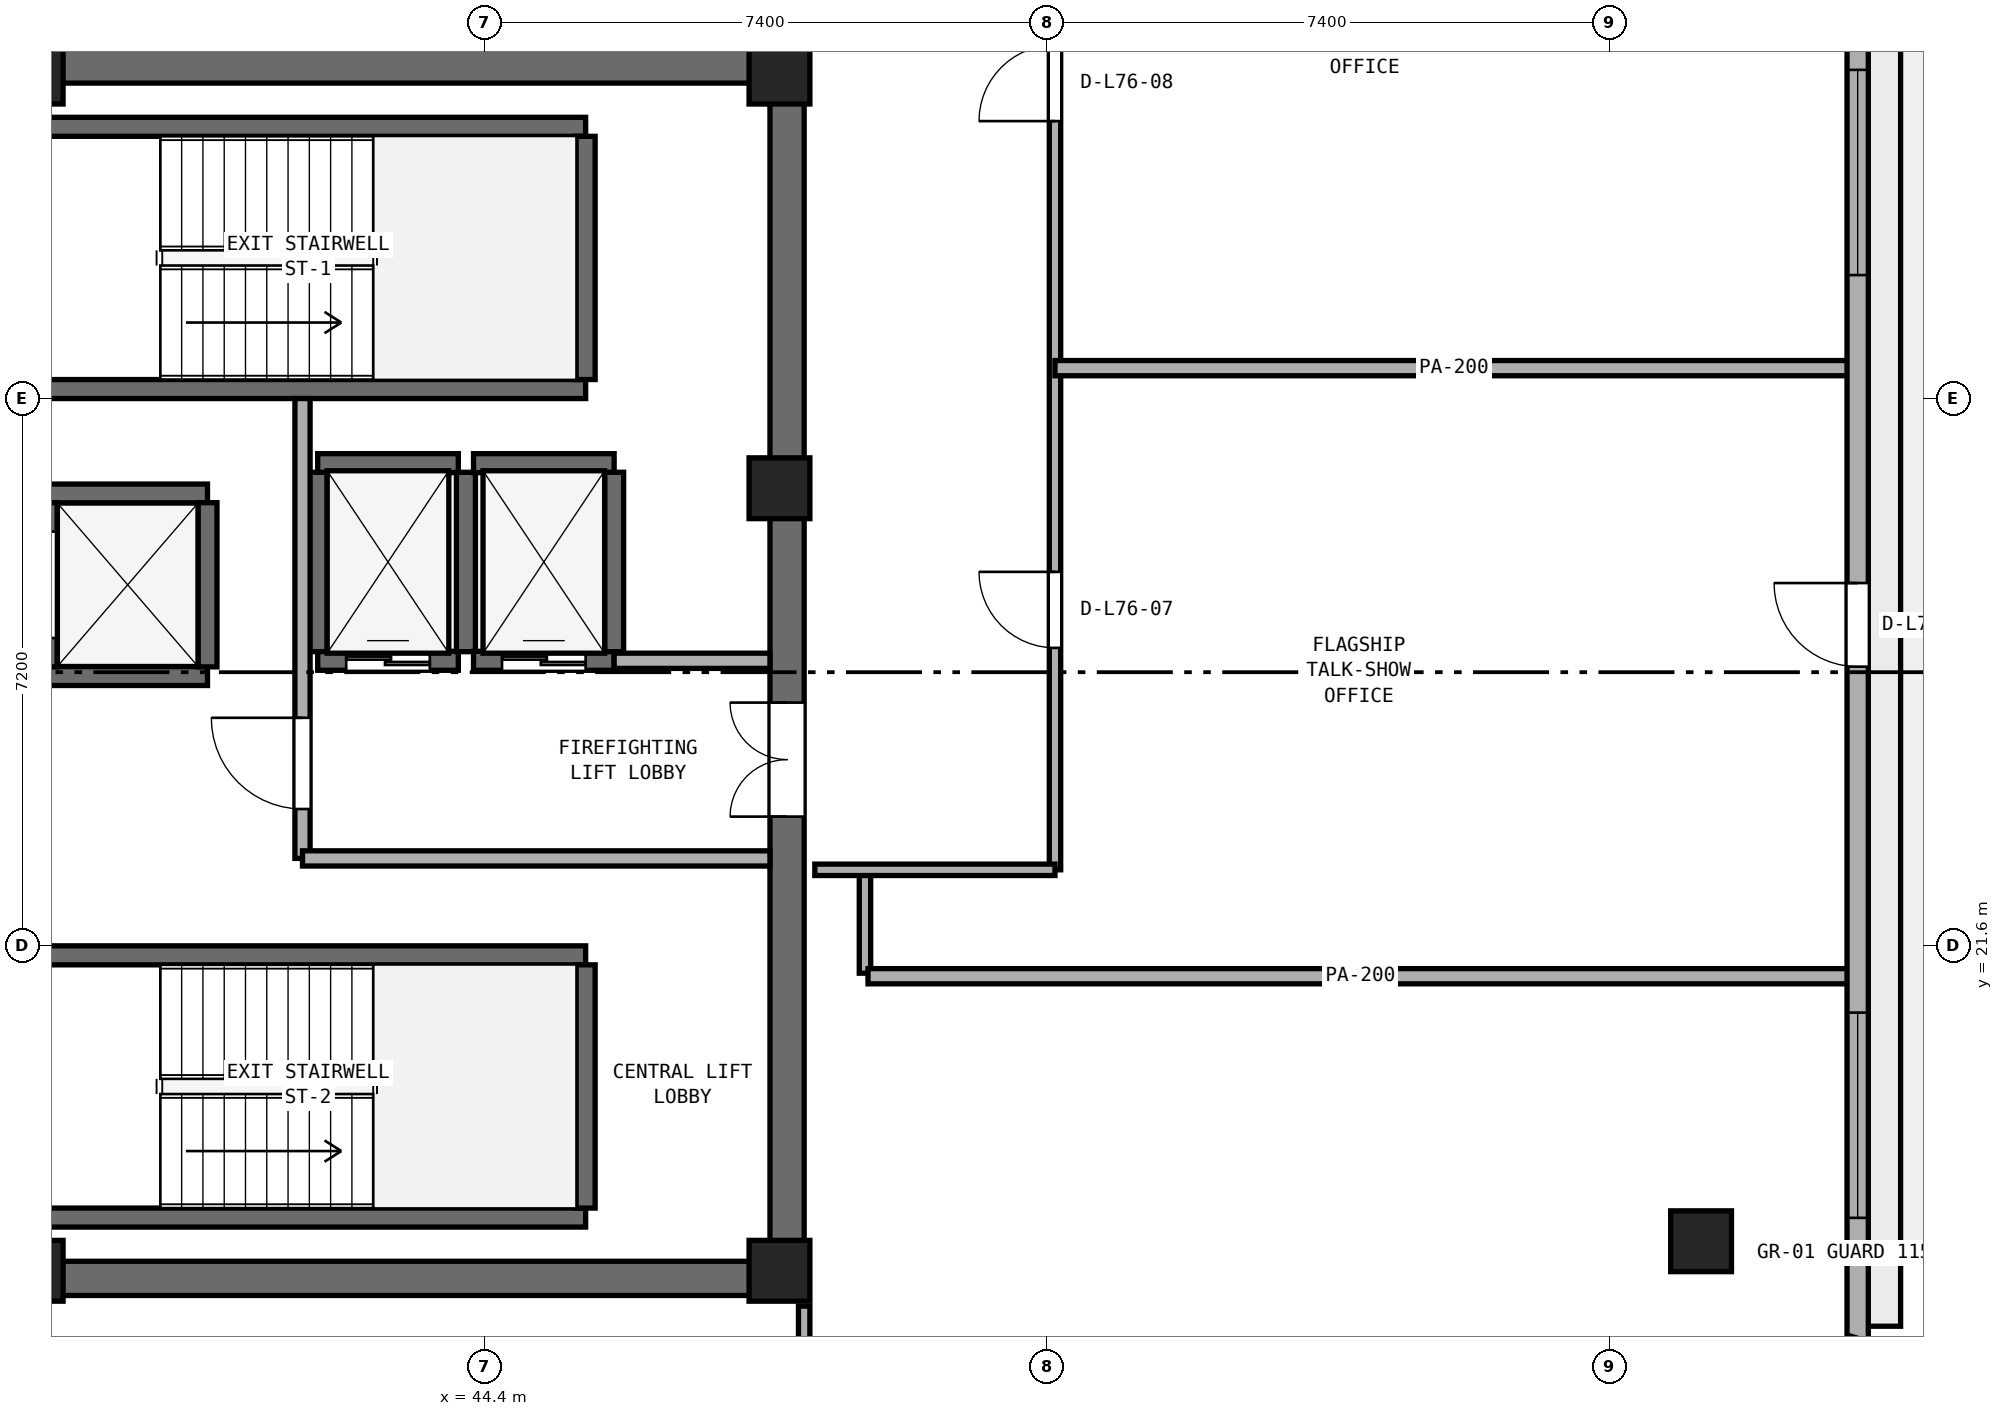
"""IFC4 building model, lengths in metres.
Left out: names, types, materials, properties, quantities, classifications, styles, units other than length and angle.
Written with IfcOpenShell. Run it as: python <this file> out.ifc"""

import sys

from ifc_helpers import new_model, si_unit, direction, frame, frame_2d, origin, origin_2d, place, context, subcontext, project, spatial, rectangle, extrude, element, fill, save


model = new_model("IFC4")
c1 = context("Model", 3, precision=1e-05, world=origin(), true_north=direction((0.0, 1.0)))
c2 = subcontext(c1, "Body", "Model", "MODEL_VIEW")
j1 = project(units=[si_unit("LENGTHUNIT", "METRE"), si_unit("PLANEANGLEUNIT", "RADIAN")], contexts=[c1])
p1 = place(None, origin())
s1 = spatial("IfcSite", under=j1, at=p1, CompositionType="ELEMENT")
p2 = place(p1, origin())
s2 = spatial("IfcBuilding", under=s1, at=p2, CompositionType="ELEMENT")
p3 = place(p2, frame((0.0, 0.0, 297.2)))
s3 = spatial("IfcBuildingStorey", under=s2, at=p3, CompositionType="ELEMENT", Elevation=297.2)
for number, where, z_axis, x_axis in (
    (1, (25.4, 17.225, 0.0), (0.0, 0.0, 1.0), (1.0, 0.0, 0.0)),
    (2, (25.4, 33.175, 0.0), (0.0, 0.0, 1.0), (1.0, 0.0, 0.0)),
):
    element("IfcWall", number, at=place(p3, frame(where, z_axis=z_axis, x_axis=x_axis)), inside=s3, PredefinedType="SHEAR", context=c2, shape_type="SweptSolid", body=[
        extrude(rectangle(XDim=23.2, YDim=0.45, at=frame_2d((11.6, 0.0))), origin(), (0.0, 0.0, 1.0), 3.54),
    ])
p4 = place(p3, frame((48.375, 17.45, 0.0), z_axis=(0.0, 0.0, 1.0), x_axis=(0.0, 1.0, 0.0)))
e3 = element("IfcWall", 3, at=p4, inside=s3, PredefinedType="SHEAR", context=c2, shape_type="SweptSolid", body=[
    extrude(rectangle(XDim=15.5, YDim=0.45, at=frame_2d((7.75, 0.0))), origin(), (0.0, 0.0, 1.0), 3.54),
])
p5 = place(p4, frame((5.85, 0.0, 0.0)))
e4 = element("IfcOpeningElement", 4, at=p5, cuts=e3, PredefinedType="OPENING", context=c2, shape_type="SweptSolid", body=[
    extrude(rectangle(XDim=1.5, YDim=2.15, at=frame_2d((0.75, 1.075))), frame((0.0, 0.235, 0.0), z_axis=(0.0, -1.0, 0.0), x_axis=(1.0, 0.0, 0.0)), (0.0, 0.0, 1.0), 0.47),
])
for number, where, z_axis, x_axis in (
    (5, (38.45, 17.325, 0.0), (0.0, 0.0, 1.0), (1.0, 0.0, 0.0)),
    (6, (48.275, 17.325, 0.0), (0.0, 0.0, 1.0), (1.0, 0.0, 0.0)),
    (7, (48.275, 27.62, 0.0), (0.0, 0.0, 1.0), (1.0, 0.0, 0.0)),
    (8, (48.275, 33.075, 0.0), (0.0, 0.0, 1.0), (1.0, 0.0, 0.0)),
    (9, (38.45, 33.075, 0.0), (0.0, 0.0, 1.0), (1.0, 0.0, 0.0)),
):
    element("IfcColumn", number, at=place(p3, frame(where, z_axis=z_axis, x_axis=x_axis)), inside=s3, PredefinedType="PILASTER", context=c2, shape_type="SweptSolid", body=[
        extrude(rectangle(XDim=0.8, YDim=0.8, at=origin_2d()), origin(), (0.0, 0.0, 1.0), 3.8),
    ])
p6 = place(p3, frame((60.4, 17.714, 0.0), z_axis=(0.0, 0.0, 1.0), x_axis=(1.0, 0.0, 0.0)))
e10 = element("IfcColumn", 10, at=p6, inside=s3, PredefinedType="COLUMN", context=c2, shape_type="SweptSolid", body=[
    extrude(rectangle(XDim=0.8, YDim=0.8, at=origin_2d()), origin(), (0.0, 0.0, 1.0), 3.8),
])
for number, where, z_axis, x_axis in (
    (11, (38.425, 28.925, 0.0), (0.0, 0.0, 1.0), (1.0, 0.0, 0.0)),
    (12, (38.425, 32.375, 0.0), (0.0, 0.0, 1.0), (1.0, 0.0, 0.0)),
):
    element("IfcWall", number, at=place(p3, frame(where, z_axis=z_axis, x_axis=x_axis)), inside=s3, PredefinedType="SHEAR", context=c2, shape_type="SweptSolid", body=[
        extrude(rectangle(XDim=7.3, YDim=0.25, at=frame_2d((3.65, 0.0))), origin(), (0.0, 0.0, 1.0), 3.54),
    ])
p7 = place(p3, frame((45.725, 29.05, 0.0), z_axis=(0.0, 0.0, 1.0), x_axis=(0.0, 1.0, 0.0)))
e13 = element("IfcWall", 13, at=p7, inside=s3, PredefinedType="SHEAR", context=c2, shape_type="SweptSolid", body=[
    extrude(rectangle(XDim=3.2, YDim=0.25, at=frame_2d((1.6, 0.0))), origin(), (0.0, 0.0, 1.0), 3.54),
])
for number, where, z_axis, x_axis in (
    (14, (38.425, 18.025, 0.0), (0.0, 0.0, 1.0), (1.0, 0.0, 0.0)),
    (15, (38.425, 21.475, 0.0), (0.0, 0.0, 1.0), (1.0, 0.0, 0.0)),
):
    element("IfcWall", number, at=place(p3, frame(where, z_axis=z_axis, x_axis=x_axis)), inside=s3, PredefinedType="SHEAR", context=c2, shape_type="SweptSolid", body=[
        extrude(rectangle(XDim=7.3, YDim=0.25, at=frame_2d((3.65, 0.0))), origin(), (0.0, 0.0, 1.0), 3.54),
    ])
p8 = place(p3, frame((45.725, 18.15, 0.0), z_axis=(0.0, 0.0, 1.0), x_axis=(0.0, 1.0, 0.0)))
e16 = element("IfcWall", 16, at=p8, inside=s3, PredefinedType="SHEAR", context=c2, shape_type="SweptSolid", body=[
    extrude(rectangle(XDim=3.2, YDim=0.25, at=frame_2d((1.6, 0.0))), origin(), (0.0, 0.0, 1.0), 3.54),
])
p9 = place(p3, frame((42.2, 25.35, 0.0), z_axis=(0.0, 0.0, 1.0), x_axis=(1.0, 0.0, 0.0)))
e17 = element("IfcWall", 17, at=p9, inside=s3, PredefinedType="SHEAR", context=c2, shape_type="SweptSolid", body=[
    extrude(rectangle(XDim=1.85, YDim=0.25, at=frame_2d((0.925, 0.0))), origin(), (0.0, 0.0, 1.0), 3.54),
])
p10 = place(p9, frame((0.375, 0.0, 0.0)))
e18 = element("IfcOpeningElement", 18, at=p10, cuts=e17, PredefinedType="OPENING", context=c2, shape_type="SweptSolid", body=[
    extrude(rectangle(XDim=1.1, YDim=2.15, at=frame_2d((0.55, 1.075))), frame((0.0, 0.135, 0.0), z_axis=(0.0, -1.0, 0.0), x_axis=(1.0, 0.0, 0.0)), (0.0, 0.0, 1.0), 0.27),
])
p11 = place(p3, frame((42.2, 27.95, 0.0), z_axis=(0.0, 0.0, 1.0), x_axis=(1.0, 0.0, 0.0)))
e19 = element("IfcWall", 19, at=p11, inside=s3, PredefinedType="SHEAR", context=c2, shape_type="SweptSolid", body=[
    extrude(rectangle(XDim=1.85, YDim=0.25, at=frame_2d((0.925, 0.0))), origin(), (0.0, 0.0, 1.0), 3.54),
])
for number, where, z_axis, x_axis in (
    (20, (42.2, 25.47, 0.0), (0.0, 0.0, 1.0), (0.0, 1.0, 0.0)),
    (21, (44.15, 25.47, 0.0), (0.0, 0.0, 1.0), (0.0, 1.0, 0.0)),
):
    element("IfcWall", number, at=place(p3, frame(where, z_axis=z_axis, x_axis=x_axis)), inside=s3, PredefinedType="SHEAR", context=c2, shape_type="SweptSolid", body=[
        extrude(rectangle(XDim=2.36, YDim=0.25, at=frame_2d((1.18, 0.0))), origin(), (0.0, 0.0, 1.0), 3.54),
    ])
p12 = place(p3, frame((44.25, 25.35, 0.0), z_axis=(0.0, 0.0, 1.0), x_axis=(1.0, 0.0, 0.0)))
e22 = element("IfcWall", 22, at=p12, inside=s3, PredefinedType="SHEAR", context=c2, shape_type="SweptSolid", body=[
    extrude(rectangle(XDim=1.85, YDim=0.25, at=frame_2d((0.925, 0.0))), origin(), (0.0, 0.0, 1.0), 3.54),
])
p13 = place(p12, frame((0.375, 0.0, 0.0)))
e23 = element("IfcOpeningElement", 23, at=p13, cuts=e22, PredefinedType="OPENING", context=c2, shape_type="SweptSolid", body=[
    extrude(rectangle(XDim=1.1, YDim=2.15, at=frame_2d((0.55, 1.075))), frame((0.0, 0.135, 0.0), z_axis=(0.0, -1.0, 0.0), x_axis=(1.0, 0.0, 0.0)), (0.0, 0.0, 1.0), 0.27),
])
p14 = place(p3, frame((44.25, 27.95, 0.0), z_axis=(0.0, 0.0, 1.0), x_axis=(1.0, 0.0, 0.0)))
e24 = element("IfcWall", 24, at=p14, inside=s3, PredefinedType="SHEAR", context=c2, shape_type="SweptSolid", body=[
    extrude(rectangle(XDim=1.85, YDim=0.25, at=frame_2d((0.925, 0.0))), origin(), (0.0, 0.0, 1.0), 3.54),
])
p15 = place(p3, frame((46.1, 25.47, 0.0), z_axis=(0.0, 0.0, 1.0), x_axis=(0.0, 1.0, 0.0)))
e25 = element("IfcWall", 25, at=p15, inside=s3, PredefinedType="SHEAR", context=c2, shape_type="SweptSolid", body=[
    extrude(rectangle(XDim=2.36, YDim=0.25, at=frame_2d((1.18, 0.0))), origin(), (0.0, 0.0, 1.0), 3.54),
])
for number, where, z_axis, x_axis in (
    (26, (38.65, 25.15, 0.0), (0.0, 0.0, 1.0), (1.0, 0.0, 0.0)),
    (27, (38.65, 27.55, 0.0), (0.0, 0.0, 1.0), (1.0, 0.0, 0.0)),
):
    element("IfcWall", number, at=place(p3, frame(where, z_axis=z_axis, x_axis=x_axis)), inside=s3, PredefinedType="SHEAR", context=c2, shape_type="SweptSolid", body=[
        extrude(rectangle(XDim=2.1, YDim=0.25, at=frame_2d((1.05, 0.0))), origin(), (0.0, 0.0, 1.0), 3.54),
    ])
p16 = place(p3, frame((38.65, 25.27, 0.0), z_axis=(0.0, 0.0, 1.0), x_axis=(0.0, 1.0, 0.0)))
e28 = element("IfcWall", 28, at=p16, inside=s3, PredefinedType="SHEAR", context=c2, shape_type="SweptSolid", body=[
    extrude(rectangle(XDim=2.16, YDim=0.25, at=frame_2d((1.08, 0.0))), origin(), (0.0, 0.0, 1.0), 3.54),
])
p17 = place(p16, frame((0.38, 0.0, 0.0)))
e29 = element("IfcOpeningElement", 29, at=p17, cuts=e28, PredefinedType="OPENING", context=c2, shape_type="SweptSolid", body=[
    extrude(rectangle(XDim=1.4, YDim=2.2, at=frame_2d((0.7, 1.1))), frame((0.0, 0.135, 0.0), z_axis=(0.0, -1.0, 0.0), x_axis=(1.0, 0.0, 0.0)), (0.0, 0.0, 1.0), 0.27),
])
p18 = place(p3, frame((40.75, 25.27, 0.0), z_axis=(0.0, 0.0, 1.0), x_axis=(0.0, 1.0, 0.0)))
e30 = element("IfcWall", 30, at=p18, inside=s3, PredefinedType="SHEAR", context=c2, shape_type="SweptSolid", body=[
    extrude(rectangle(XDim=2.16, YDim=0.25, at=frame_2d((1.08, 0.0))), origin(), (0.0, 0.0, 1.0), 3.54),
])
p19 = place(p3, frame((42.0, 22.75, 0.0), z_axis=(0.0, 0.0, 1.0), x_axis=(0.0, 1.0, 0.0)))
e31 = element("IfcWall", 31, at=p19, inside=s3, PredefinedType="SOLIDWALL", context=c2, shape_type="SweptSolid", body=[
    extrude(rectangle(XDim=6.05, YDim=0.2, at=frame_2d((3.025, 0.0))), origin(), (0.0, 0.0, 1.0), 3.54),
])
p20 = place(p19, frame((0.65, 0.0, 0.0)))
e32 = element("IfcOpeningElement", 32, at=p20, cuts=e31, PredefinedType="OPENING", context=c2, shape_type="SweptSolid", body=[
    extrude(rectangle(XDim=1.2, YDim=2.15, at=frame_2d((0.6, 1.075))), frame((0.0, 0.11, 0.0), z_axis=(0.0, -1.0, 0.0), x_axis=(1.0, 0.0, 0.0)), (0.0, 0.0, 1.0), 0.22),
])
p21 = place(p3, frame((42.0, 22.75, 0.0), z_axis=(0.0, 0.0, 1.0), x_axis=(1.0, 0.0, 0.0)))
e33 = element("IfcWall", 33, at=p21, inside=s3, PredefinedType="SOLIDWALL", context=c2, shape_type="SweptSolid", body=[
    extrude(rectangle(XDim=6.15, YDim=0.2, at=frame_2d((3.075, 0.0))), origin(), (0.0, 0.0, 1.0), 3.54),
])
p22 = place(p3, frame((46.1, 25.35, 0.0), z_axis=(0.0, 0.0, 1.0), x_axis=(1.0, 0.0, 0.0)))
e34 = element("IfcWall", 34, at=p22, inside=s3, PredefinedType="SOLIDWALL", context=c2, shape_type="SweptSolid", body=[
    extrude(rectangle(XDim=2.05, YDim=0.2, at=frame_2d((1.025, 0.0))), origin(), (0.0, 0.0, 1.0), 3.54),
])
p23 = place(p3, frame((51.9, 22.6, 0.0), z_axis=(0.0, 0.0, 1.0), x_axis=(0.0, 1.0, 0.0)))
e35 = element("IfcWall", 35, at=p23, inside=s3, PredefinedType="PARTITIONING", context=c2, shape_type="SweptSolid", body=[
    extrude(rectangle(XDim=22.376, YDim=0.15, at=frame_2d((11.188, 0.0))), origin(), (0.0, 0.0, 1.0), 3.54),
])
p24 = place(p23, frame((2.92, 0.0, 0.0)))
e36 = element("IfcOpeningElement", 36, at=p24, cuts=e35, PredefinedType="OPENING", context=c2, shape_type="SweptSolid", body=[
    extrude(rectangle(XDim=1.0, YDim=2.12, at=frame_2d((0.5, 1.06))), frame((0.0, 0.085, 0.0), z_axis=(0.0, -1.0, 0.0), x_axis=(1.0, 0.0, 0.0)), (0.0, 0.0, 1.0), 0.17),
])
p25 = place(p23, frame((9.85, 0.0, 0.0)))
e37 = element("IfcOpeningElement", 37, at=p25, cuts=e35, PredefinedType="OPENING", context=c2, shape_type="SweptSolid", body=[
    extrude(rectangle(XDim=1.0, YDim=2.12, at=frame_2d((0.5, 1.06))), frame((0.0, 0.085, 0.0), z_axis=(0.0, -1.0, 0.0), x_axis=(1.0, 0.0, 0.0)), (0.0, 0.0, 1.0), 0.17),
])
p26 = place(p3, frame((49.4, 21.24, 0.0), z_axis=(0.0, 0.0, 1.0), x_axis=(0.0, 1.0, 0.0)))
e38 = element("IfcWall", 38, at=p26, inside=s3, PredefinedType="PARTITIONING", context=c2, shape_type="SweptSolid", body=[
    extrude(rectangle(XDim=1.359, YDim=0.15, at=frame_2d((0.68, 0.0))), origin(), (0.0, 0.0, 1.0), 3.54),
])
p27 = place(p3, frame((48.6, 13.7, 0.0), z_axis=(0.0, 0.0, 1.0), x_axis=(0.0, 1.0, 0.0)))
e39 = element("IfcWall", 39, at=p27, inside=s3, PredefinedType="PARTITIONING", context=c2, shape_type="SweptSolid", body=[
    extrude(rectangle(XDim=3.16, YDim=0.15, at=frame_2d((1.58, 0.0))), origin(), (0.0, 0.0, 1.0), 3.54),
])
p28 = place(p3, frame((49.44, 21.2, 0.0), z_axis=(0.0, 0.0, 1.0), x_axis=(1.0, 0.0, 0.0)))
e40 = element("IfcWall", 40, at=p28, inside=s3, PredefinedType="PARTITIONING", context=c2, shape_type="SweptSolid", body=[
    extrude(rectangle(XDim=12.955, YDim=0.2, at=frame_2d((6.478, 0.0))), origin(), (0.0, 0.0, 1.0), 3.54),
])
p29 = place(p3, frame((48.74, 22.6, 0.0), z_axis=(0.0, 0.0, 1.0), x_axis=(1.0, 0.0, 0.0)))
e41 = element("IfcWall", 41, at=p29, inside=s3, PredefinedType="PARTITIONING", context=c2, shape_type="SweptSolid", body=[
    extrude(rectangle(XDim=3.16, YDim=0.15, at=frame_2d((1.58, 0.0))), origin(), (0.0, 0.0, 1.0), 3.54),
])
p30 = place(p3, frame((51.9, 29.2, 0.0), z_axis=(0.0, 0.0, 1.0), x_axis=(1.0, 0.0, 0.0)))
e42 = element("IfcWall", 42, at=p30, inside=s3, PredefinedType="PARTITIONING", context=c2, shape_type="SweptSolid", body=[
    extrude(rectangle(XDim=10.495, YDim=0.2, at=frame_2d((5.248, 0.0))), origin(), (0.0, 0.0, 1.0), 3.54),
])
p31 = place(p3, frame((62.46, 16.396, 0.0), z_axis=(0.0, 0.0, 1.0), x_axis=(0.0, 1.0, 0.0)))
e43 = element("IfcWall", 43, at=p31, inside=s3, PredefinedType="STANDARD", context=c2, shape_type="SweptSolid", body=[
    extrude(rectangle(XDim=18.854, YDim=0.28, at=frame_2d((9.427, 0.0))), origin(), (0.0, 0.0, 1.0), 3.54),
])
p32 = place(p31, frame((8.877, 0.0, 0.0)))
e44 = element("IfcOpeningElement", 44, at=p32, cuts=e43, PredefinedType="OPENING", context=c2, shape_type="SweptSolid", body=[
    extrude(rectangle(XDim=1.1, YDim=2.2, at=frame_2d((0.55, 1.1))), frame((0.0, 0.15, 0.0), z_axis=(0.0, -1.0, 0.0), x_axis=(1.0, 0.0, 0.0)), (0.0, 0.0, 1.0), 0.3),
])
p33 = place(p31, frame((1.626, 0.0, 0.9)))
e45 = element("IfcOpeningElement", 45, at=p33, cuts=e43, PredefinedType="OPENING", context=c2, shape_type="SweptSolid", body=[
    extrude(rectangle(XDim=2.7, YDim=1.75, at=frame_2d((1.35, 0.875))), frame((0.0, 0.15, 0.0), z_axis=(0.0, -1.0, 0.0), x_axis=(1.0, 0.0, 0.0)), (0.0, 0.0, 1.0), 0.3),
])
p34 = place(p31, frame((14.029, 0.0, 0.9)))
e46 = element("IfcOpeningElement", 46, at=p34, cuts=e43, PredefinedType="OPENING", context=c2, shape_type="SweptSolid", body=[
    extrude(rectangle(XDim=2.7, YDim=1.75, at=frame_2d((1.35, 0.875))), frame((0.0, 0.15, 0.0), z_axis=(0.0, -1.0, 0.0), x_axis=(1.0, 0.0, 0.0)), (0.0, 0.0, 1.0), 0.3),
])
p35 = place(p3, frame((61.839, 14.344, 0.0), z_axis=(0.0, 0.0, 1.0), x_axis=(0.287235049694, 0.957860128739, 0.0)))
e47 = element("IfcWall", 47, at=p35, inside=s3, PredefinedType="STANDARD", context=c2, shape_type="SweptSolid", body=[
    extrude(rectangle(XDim=2.184, YDim=0.28, at=frame_2d((1.092, 0.0))), origin(), (0.0, 0.0, 1.0), 3.54),
])
p36 = place(p10, origin())
e48 = element("IfcDoor", 48, at=p36, inside=s3, OperationType="DOUBLE_DOOR_SLIDING", PredefinedType="DOOR", context=c2, shape_type="SweptSolid", body=[
    extrude(rectangle(XDim=1.1, YDim=2.15, at=frame_2d((0.55, 1.075))), frame((0.0, 0.025, 0.0), z_axis=(0.0, -1.0, 0.0), x_axis=(1.0, 0.0, 0.0)), (0.0, 0.0, 1.0), 0.05),
])
fill(e18, e48)
p37 = place(p13, origin())
e49 = element("IfcDoor", 49, at=p37, inside=s3, OperationType="DOUBLE_DOOR_SLIDING", PredefinedType="DOOR", context=c2, shape_type="SweptSolid", body=[
    extrude(rectangle(XDim=1.1, YDim=2.15, at=frame_2d((0.55, 1.075))), frame((0.0, 0.025, 0.0), z_axis=(0.0, -1.0, 0.0), x_axis=(1.0, 0.0, 0.0)), (0.0, 0.0, 1.0), 0.05),
])
fill(e23, e49)
p38 = place(p20, origin())
e50 = element("IfcDoor", 50, at=p38, inside=s3, OperationType="SINGLE_SWING_RIGHT", PredefinedType="DOOR", context=c2, shape_type="SweptSolid", body=[
    extrude(rectangle(XDim=1.2, YDim=2.15, at=frame_2d((0.6, 1.075))), frame((0.0, 0.025, 0.0), z_axis=(0.0, -1.0, 0.0), x_axis=(1.0, 0.0, 0.0)), (0.0, 0.0, 1.0), 0.05),
])
fill(e32, e50)
p39 = place(p5, origin())
e51 = element("IfcDoor", 51, at=p39, inside=s3, OperationType="DOUBLE_DOOR_SINGLE_SWING", PredefinedType="DOOR", context=c2, shape_type="SweptSolid", body=[
    extrude(rectangle(XDim=1.5, YDim=2.15, at=frame_2d((0.75, 1.075))), frame((0.0, 0.025, 0.0), z_axis=(0.0, -1.0, 0.0), x_axis=(1.0, 0.0, 0.0)), (0.0, 0.0, 1.0), 0.05),
])
fill(e4, e51)
p40 = place(p24, origin())
e52 = element("IfcDoor", 52, at=p40, inside=s3, OperationType="SINGLE_SWING_RIGHT", PredefinedType="DOOR", context=c2, shape_type="SweptSolid", body=[
    extrude(rectangle(XDim=1.0, YDim=2.12, at=frame_2d((0.5, 1.06))), frame((0.0, 0.025, 0.0), z_axis=(0.0, -1.0, 0.0), x_axis=(1.0, 0.0, 0.0)), (0.0, 0.0, 1.0), 0.05),
])
fill(e36, e52)
p41 = place(p25, origin())
e53 = element("IfcDoor", 53, at=p41, inside=s3, OperationType="SINGLE_SWING_LEFT", PredefinedType="DOOR", context=c2, shape_type="SweptSolid", body=[
    extrude(rectangle(XDim=1.0, YDim=2.12, at=frame_2d((0.5, 1.06))), frame((0.0, 0.025, 0.0), z_axis=(0.0, -1.0, 0.0), x_axis=(1.0, 0.0, 0.0)), (0.0, 0.0, 1.0), 0.05),
])
fill(e37, e53)
p42 = place(p32, origin())
e54 = element("IfcDoor", 54, at=p42, inside=s3, OperationType="SINGLE_SWING_RIGHT", PredefinedType="DOOR", context=c2, shape_type="SweptSolid", body=[
    extrude(rectangle(XDim=1.1, YDim=2.2, at=frame_2d((0.55, 1.1))), frame((0.0, 0.025, 0.0), z_axis=(0.0, -1.0, 0.0), x_axis=(1.0, 0.0, 0.0)), (0.0, 0.0, 1.0), 0.05),
])
fill(e44, e54)
p43 = place(p33, origin())
e55 = element("IfcWindow", 55, at=p43, inside=s3, PartitioningType="SINGLE_PANEL", PredefinedType="WINDOW", context=c2, shape_type="SweptSolid", body=[
    extrude(rectangle(XDim=2.7, YDim=1.75, at=frame_2d((1.35, 0.875))), frame((0.0, 0.03, 0.0), z_axis=(0.0, -1.0, 0.0), x_axis=(1.0, 0.0, 0.0)), (0.0, 0.0, 1.0), 0.06),
])
fill(e45, e55)
p44 = place(p34, origin())
e56 = element("IfcWindow", 56, at=p44, inside=s3, PartitioningType="SINGLE_PANEL", PredefinedType="WINDOW", context=c2, shape_type="SweptSolid", body=[
    extrude(rectangle(XDim=2.7, YDim=1.75, at=frame_2d((1.35, 0.875))), frame((0.0, 0.03, 0.0), z_axis=(0.0, -1.0, 0.0), x_axis=(1.0, 0.0, 0.0)), (0.0, 0.0, 1.0), 0.06),
])
fill(e46, e56)
save(model, sys.argv[1])
